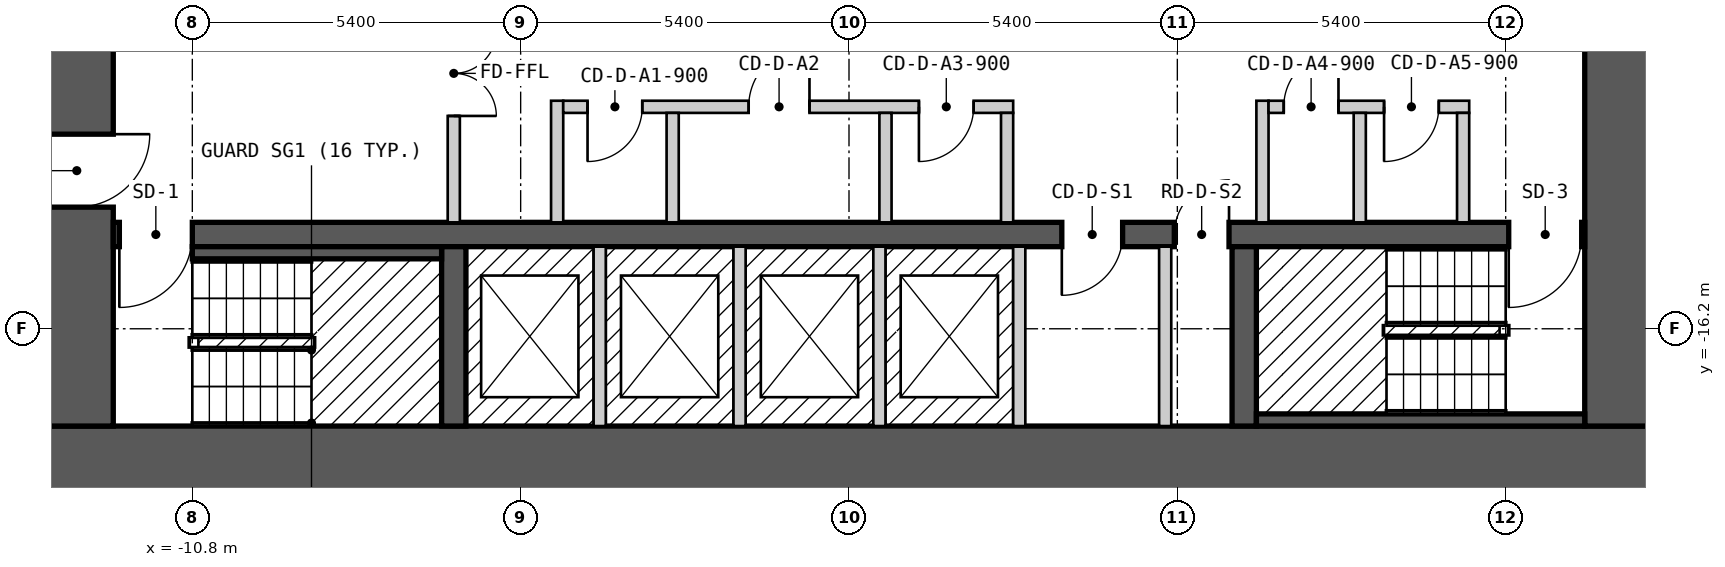
"""IFC4 building model, lengths in metres.
Left out: names, types, materials, properties, quantities, classifications, styles, units other than length and angle.
Written with IfcOpenShell. Run it as: python <this file> out.ifc"""

import sys

from ifc_helpers import new_model, si_unit, direction, frame, frame_2d, origin, place, context, subcontext, project, spatial, rectangle, extrude, element, fill, save


model = new_model("IFC4")
c1 = context("Model", 3, precision=1e-05, world=origin(), true_north=direction((0.0, 1.0)))
c2 = subcontext(c1, "Body", "Model", "MODEL_VIEW")
j1 = project(units=[si_unit("LENGTHUNIT", "METRE"), si_unit("PLANEANGLEUNIT", "RADIAN")], contexts=[c1])
p1 = place(None, origin())
s1 = spatial("IfcSite", under=j1, at=p1, CompositionType="ELEMENT")
p2 = place(p1, origin())
s2 = spatial("IfcBuilding", under=s1, at=p2, CompositionType="ELEMENT")
p3 = place(p2, frame((0.0, 0.0, 59.4)))
s3 = spatial("IfcBuildingStorey", under=s2, at=p3, CompositionType="ELEMENT", Elevation=59.4)
p4 = place(p3, frame((-13.3, -18.4, 0.0), z_axis=(0.0, 0.0, 1.0), x_axis=(1.0, 0.0, 0.0)))
e1 = element("IfcWall", 1, at=p4, inside=s3, PredefinedType="SHEAR", context=c2, shape_type="SweptSolid", body=[
    extrude(rectangle(XDim=26.6, YDim=1.2, at=frame_2d((13.3, 0.0))), origin(), (0.0, 0.0, 1.0), 2.6),
])
p5 = place(p3, frame((-12.7, -17.8, 0.0), z_axis=(0.0, 0.0, 1.0), x_axis=(0.0, 1.0, 0.0)))
e2 = element("IfcWall", 2, at=p5, inside=s3, PredefinedType="SHEAR", context=c2, shape_type="SweptSolid", body=[
    extrude(rectangle(XDim=11.6, YDim=1.2, at=frame_2d((5.8, 0.0))), origin(), (0.0, 0.0, 1.0), 2.6),
])
p6 = place(p5, frame((3.6, 0.0, 0.0)))
e3 = element("IfcOpeningElement", 3, at=p6, cuts=e2, PredefinedType="OPENING", context=c2, shape_type="SweptSolid", body=[
    extrude(rectangle(XDim=1.2, YDim=2.1, at=frame_2d((0.6, 1.05))), frame((0.0, 0.61, 0.0), z_axis=(0.0, -1.0, 0.0), x_axis=(1.0, 0.0, 0.0)), (0.0, 0.0, 1.0), 1.22),
])
p7 = place(p3, frame((12.7, -17.8, 0.0), z_axis=(0.0, 0.0, 1.0), x_axis=(0.0, 1.0, 0.0)))
e4 = element("IfcWall", 4, at=p7, inside=s3, PredefinedType="SHEAR", context=c2, shape_type="SweptSolid", body=[
    extrude(rectangle(XDim=11.6, YDim=1.2, at=frame_2d((5.8, 0.0))), origin(), (0.0, 0.0, 1.0), 2.6),
])
p8 = place(p3, frame((-12.1, -14.65, 0.0), z_axis=(0.0, 0.0, 1.0), x_axis=(1.0, 0.0, 0.0)))
e5 = element("IfcWall", 5, at=p8, inside=s3, PredefinedType="SHEAR", context=c2, shape_type="SweptSolid", body=[
    extrude(rectangle(XDim=24.2, YDim=0.4, at=frame_2d((12.1, 0.0))), origin(), (0.0, 0.0, 1.0), 2.6),
])
p9 = place(p8, frame((1.3, 0.0, 0.0), z_axis=(0.0, 0.0, 1.0), x_axis=(-1.0, 0.0, 0.0)))
e6 = element("IfcOpeningElement", 6, at=p9, cuts=e5, PredefinedType="OPENING", context=c2, shape_type="SweptSolid", body=[
    extrude(rectangle(XDim=1.2, YDim=2.1, at=frame_2d((0.6, 1.05))), frame((0.0, 0.21, 0.0), z_axis=(0.0, -1.0, 0.0), x_axis=(1.0, 0.0, 0.0)), (0.0, 0.0, 1.0), 0.42),
])
p10 = place(p8, frame((24.15, 0.0, 0.0), z_axis=(0.0, 0.0, 1.0), x_axis=(-1.0, 0.0, 0.0)))
e7 = element("IfcOpeningElement", 7, at=p10, cuts=e5, PredefinedType="OPENING", context=c2, shape_type="SweptSolid", body=[
    extrude(rectangle(XDim=1.2, YDim=2.1, at=frame_2d((0.6, 1.05))), frame((0.0, 0.21, 0.0), z_axis=(0.0, -1.0, 0.0), x_axis=(1.0, 0.0, 0.0)), (0.0, 0.0, 1.0), 0.42),
])
p11 = place(p8, frame((16.6, 0.0, 0.0), z_axis=(0.0, 0.0, 1.0), x_axis=(-1.0, 0.0, 0.0)))
e8 = element("IfcOpeningElement", 8, at=p11, cuts=e5, PredefinedType="OPENING", context=c2, shape_type="SweptSolid", body=[
    extrude(rectangle(XDim=1.0, YDim=2.1, at=frame_2d((0.5, 1.05))), frame((0.0, 0.21, 0.0), z_axis=(0.0, -1.0, 0.0), x_axis=(1.0, 0.0, 0.0)), (0.0, 0.0, 1.0), 0.42),
])
p12 = place(p8, frame((18.35, 0.0, 0.0), z_axis=(0.0, 0.0, 1.0), x_axis=(-1.0, 0.0, 0.0)))
e9 = element("IfcOpeningElement", 9, at=p12, cuts=e5, PredefinedType="OPENING", context=c2, shape_type="SweptSolid", body=[
    extrude(rectangle(XDim=0.9, YDim=2.1, at=frame_2d((0.45, 1.05))), frame((0.0, 0.21, 0.0), z_axis=(0.0, -1.0, 0.0), x_axis=(1.0, 0.0, 0.0)), (0.0, 0.0, 1.0), 0.42),
])
for number, where, z_axis, x_axis in (
    (10, (-6.5, -17.8, 0.0), (0.0, 0.0, 1.0), (0.0, 1.0, 0.0)),
    (11, (6.5, -17.8, 0.0), (0.0, 0.0, 1.0), (0.0, 1.0, 0.0)),
):
    element("IfcWall", number, at=place(p3, frame(where, z_axis=z_axis, x_axis=x_axis)), inside=s3, PredefinedType="SHEAR", context=c2, shape_type="SweptSolid", body=[
        extrude(rectangle(XDim=2.95, YDim=0.4, at=frame_2d((1.475, 0.0))), origin(), (0.0, 0.0, 1.0), 2.6),
    ])
p13 = place(p3, frame((-10.8, -14.95, 0.0), z_axis=(0.0, 0.0, 1.0), x_axis=(1.0, 0.0, 0.0)))
e12 = element("IfcWall", 12, at=p13, inside=s3, PredefinedType="SOLIDWALL", context=c2, shape_type="SweptSolid", body=[
    extrude(rectangle(XDim=4.1, YDim=0.2, at=frame_2d((2.05, 0.0))), origin(), (0.0, 0.0, 1.0), 2.6),
])
p14 = place(p3, frame((-6.5, -14.45, 0.0), z_axis=(0.0, 0.0, 1.0), x_axis=(0.0, 1.0, 0.0)))
e13 = element("IfcWall", 13, at=p14, inside=s3, PredefinedType="PARTITIONING", context=c2, shape_type="SweptSolid", body=[
    extrude(rectangle(XDim=4.9, YDim=0.2, at=frame_2d((2.45, 0.0))), origin(), (0.0, 0.0, 1.0), 2.6),
])
p15 = place(p14, frame((3.15, 0.0, 0.0), z_axis=(0.0, 0.0, 1.0), x_axis=(-1.0, 0.0, 0.0)))
e14 = element("IfcOpeningElement", 14, at=p15, cuts=e13, PredefinedType="OPENING", context=c2, shape_type="SweptSolid", body=[
    extrude(rectangle(XDim=1.4, YDim=2.1, at=frame_2d((0.7, 1.05))), frame((0.0, 0.11, 0.0), z_axis=(0.0, -1.0, 0.0), x_axis=(1.0, 0.0, 0.0)), (0.0, 0.0, 1.0), 0.22),
])
p16 = place(p3, frame((-4.8, -14.45, 0.0), z_axis=(0.0, 0.0, 1.0), x_axis=(0.0, 1.0, 0.0)))
e15 = element("IfcWall", 15, at=p16, inside=s3, PredefinedType="PARTITIONING", context=c2, shape_type="SweptSolid", body=[
    extrude(rectangle(XDim=2.0, YDim=0.2, at=frame_2d((1.0, 0.0))), origin(), (0.0, 0.0, 1.0), 2.6),
])
p17 = place(p3, frame((-4.7, -12.55, 0.0), z_axis=(0.0, 0.0, 1.0), x_axis=(1.0, 0.0, 0.0)))
e16 = element("IfcWall", 16, at=p17, inside=s3, PredefinedType="PARTITIONING", context=c2, shape_type="SweptSolid", body=[
    extrude(rectangle(XDim=7.4, YDim=0.2, at=frame_2d((3.7, 0.0))), origin(), (0.0, 0.0, 1.0), 2.6),
])
p18 = place(p17, frame((1.3, 0.0, 0.0), z_axis=(0.0, 0.0, 1.0), x_axis=(-1.0, 0.0, 0.0)))
e17 = element("IfcOpeningElement", 17, at=p18, cuts=e16, PredefinedType="OPENING", context=c2, shape_type="SweptSolid", body=[
    extrude(rectangle(XDim=0.9, YDim=2.1, at=frame_2d((0.45, 1.05))), frame((0.0, 0.11, 0.0), z_axis=(0.0, -1.0, 0.0), x_axis=(1.0, 0.0, 0.0)), (0.0, 0.0, 1.0), 0.22),
])
p19 = place(p17, frame((4.05, 0.0, 0.0), z_axis=(0.0, 0.0, 1.0), x_axis=(-1.0, 0.0, 0.0)))
e18 = element("IfcOpeningElement", 18, at=p19, cuts=e16, PredefinedType="OPENING", context=c2, shape_type="SweptSolid", body=[
    extrude(rectangle(XDim=1.0, YDim=2.1, at=frame_2d((0.5, 1.05))), frame((0.0, 0.11, 0.0), z_axis=(0.0, -1.0, 0.0), x_axis=(1.0, 0.0, 0.0)), (0.0, 0.0, 1.0), 0.22),
])
p20 = place(p17, frame((6.75, 0.0, 0.0), z_axis=(0.0, 0.0, 1.0), x_axis=(-1.0, 0.0, 0.0)))
e19 = element("IfcOpeningElement", 19, at=p20, cuts=e16, PredefinedType="OPENING", context=c2, shape_type="SweptSolid", body=[
    extrude(rectangle(XDim=0.9, YDim=2.1, at=frame_2d((0.45, 1.05))), frame((0.0, 0.11, 0.0), z_axis=(0.0, -1.0, 0.0), x_axis=(1.0, 0.0, 0.0)), (0.0, 0.0, 1.0), 0.22),
])
p21 = place(p3, frame((-4.1, -17.8, 0.0), z_axis=(0.0, 0.0, 1.0), x_axis=(0.0, 1.0, 0.0)))
e20 = element("IfcWall", 20, at=p21, inside=s3, PredefinedType="SOLIDWALL", context=c2, shape_type="SweptSolid", body=[
    extrude(rectangle(XDim=2.95, YDim=0.2, at=frame_2d((1.475, 0.0))), origin(), (0.0, 0.0, 1.0), 2.6),
])
p22 = place(p3, frame((-2.9, -14.45, 0.0), z_axis=(0.0, 0.0, 1.0), x_axis=(0.0, 1.0, 0.0)))
e21 = element("IfcWall", 21, at=p22, inside=s3, PredefinedType="PARTITIONING", context=c2, shape_type="SweptSolid", body=[
    extrude(rectangle(XDim=1.8, YDim=0.2, at=frame_2d((0.9, 0.0))), origin(), (0.0, 0.0, 1.0), 2.6),
])
for number, where, z_axis, x_axis in (
    (22, (-1.8, -17.8, 0.0), (0.0, 0.0, 1.0), (0.0, 1.0, 0.0)),
    (23, (0.5, -17.8, 0.0), (0.0, 0.0, 1.0), (0.0, 1.0, 0.0)),
):
    element("IfcWall", number, at=place(p3, frame(where, z_axis=z_axis, x_axis=x_axis)), inside=s3, PredefinedType="SOLIDWALL", context=c2, shape_type="SweptSolid", body=[
        extrude(rectangle(XDim=2.95, YDim=0.2, at=frame_2d((1.475, 0.0))), origin(), (0.0, 0.0, 1.0), 2.6),
    ])
for number, where, z_axis, x_axis in (
    (24, (0.6, -14.45, 0.0), (0.0, 0.0, 1.0), (0.0, 1.0, 0.0)),
    (25, (2.6, -14.45, 0.0), (0.0, 0.0, 1.0), (0.0, 1.0, 0.0)),
):
    element("IfcWall", number, at=place(p3, frame(where, z_axis=z_axis, x_axis=x_axis)), inside=s3, PredefinedType="PARTITIONING", context=c2, shape_type="SweptSolid", body=[
        extrude(rectangle(XDim=1.8, YDim=0.2, at=frame_2d((0.9, 0.0))), origin(), (0.0, 0.0, 1.0), 2.6),
    ])
p23 = place(p3, frame((2.8, -17.8, 0.0), z_axis=(0.0, 0.0, 1.0), x_axis=(0.0, 1.0, 0.0)))
e26 = element("IfcWall", 26, at=p23, inside=s3, PredefinedType="SOLIDWALL", context=c2, shape_type="SweptSolid", body=[
    extrude(rectangle(XDim=2.95, YDim=0.2, at=frame_2d((1.475, 0.0))), origin(), (0.0, 0.0, 1.0), 2.6),
])
p24 = place(p3, frame((5.2, -17.8, 0.0), z_axis=(0.0, 0.0, 1.0), x_axis=(0.0, 1.0, 0.0)))
e27 = element("IfcWall", 27, at=p24, inside=s3, PredefinedType="PARTITIONING", context=c2, shape_type="SweptSolid", body=[
    extrude(rectangle(XDim=2.95, YDim=0.2, at=frame_2d((1.475, 0.0))), origin(), (0.0, 0.0, 1.0), 2.6),
])
p25 = place(p3, frame((6.7, -17.7, 0.0), z_axis=(0.0, 0.0, 1.0), x_axis=(1.0, 0.0, 0.0)))
e28 = element("IfcWall", 28, at=p25, inside=s3, PredefinedType="SOLIDWALL", context=c2, shape_type="SweptSolid", body=[
    extrude(rectangle(XDim=5.4, YDim=0.2, at=frame_2d((2.7, 0.0))), origin(), (0.0, 0.0, 1.0), 2.6),
])
p26 = place(p3, frame((6.8, -14.45, 0.0), z_axis=(0.0, 0.0, 1.0), x_axis=(0.0, 1.0, 0.0)))
e29 = element("IfcWall", 29, at=p26, inside=s3, PredefinedType="PARTITIONING", context=c2, shape_type="SweptSolid", body=[
    extrude(rectangle(XDim=2.0, YDim=0.2, at=frame_2d((1.0, 0.0))), origin(), (0.0, 0.0, 1.0), 2.6),
])
p27 = place(p3, frame((6.9, -12.55, 0.0), z_axis=(0.0, 0.0, 1.0), x_axis=(1.0, 0.0, 0.0)))
e30 = element("IfcWall", 30, at=p27, inside=s3, PredefinedType="PARTITIONING", context=c2, shape_type="SweptSolid", body=[
    extrude(rectangle(XDim=3.3, YDim=0.2, at=frame_2d((1.65, 0.0))), origin(), (0.0, 0.0, 1.0), 2.6),
])
p28 = place(p27, frame((1.15, 0.0, 0.0), z_axis=(0.0, 0.0, 1.0), x_axis=(-1.0, 0.0, 0.0)))
e31 = element("IfcOpeningElement", 31, at=p28, cuts=e30, PredefinedType="OPENING", context=c2, shape_type="SweptSolid", body=[
    extrude(rectangle(XDim=0.9, YDim=2.1, at=frame_2d((0.45, 1.05))), frame((0.0, 0.11, 0.0), z_axis=(0.0, -1.0, 0.0), x_axis=(1.0, 0.0, 0.0)), (0.0, 0.0, 1.0), 0.22),
])
p29 = place(p27, frame((2.8, 0.0, 0.0), z_axis=(0.0, 0.0, 1.0), x_axis=(-1.0, 0.0, 0.0)))
e32 = element("IfcOpeningElement", 32, at=p29, cuts=e30, PredefinedType="OPENING", context=c2, shape_type="SweptSolid", body=[
    extrude(rectangle(XDim=0.9, YDim=2.1, at=frame_2d((0.45, 1.05))), frame((0.0, 0.11, 0.0), z_axis=(0.0, -1.0, 0.0), x_axis=(1.0, 0.0, 0.0)), (0.0, 0.0, 1.0), 0.22),
])
for number, where, z_axis, x_axis in (
    (33, (8.4, -14.45, 0.0), (0.0, 0.0, 1.0), (0.0, 1.0, 0.0)),
    (34, (10.1, -14.45, 0.0), (0.0, 0.0, 1.0), (0.0, 1.0, 0.0)),
):
    element("IfcWall", number, at=place(p3, frame(where, z_axis=z_axis, x_axis=x_axis)), inside=s3, PredefinedType="PARTITIONING", context=c2, shape_type="SweptSolid", body=[
        extrude(rectangle(XDim=1.8, YDim=0.2, at=frame_2d((0.9, 0.0))), origin(), (0.0, 0.0, 1.0), 2.6),
    ])
p30 = place(p9, origin())
e35 = element("IfcDoor", 35, at=p30, inside=s3, OperationType="SINGLE_SWING_RIGHT", PredefinedType="DOOR", context=c2, shape_type="SweptSolid", body=[
    extrude(rectangle(XDim=1.2, YDim=2.1, at=frame_2d((0.6, 1.05))), frame((0.0, 0.025, 0.0), z_axis=(0.0, -1.0, 0.0), x_axis=(1.0, 0.0, 0.0)), (0.0, 0.0, 1.0), 0.05),
])
fill(e6, e35)
p31 = place(p10, origin())
e36 = element("IfcDoor", 36, at=p31, inside=s3, OperationType="SINGLE_SWING_RIGHT", PredefinedType="DOOR", context=c2, shape_type="SweptSolid", body=[
    extrude(rectangle(XDim=1.2, YDim=2.1, at=frame_2d((0.6, 1.05))), frame((0.0, 0.025, 0.0), z_axis=(0.0, -1.0, 0.0), x_axis=(1.0, 0.0, 0.0)), (0.0, 0.0, 1.0), 0.05),
])
fill(e7, e36)
p32 = place(p6, origin())
e37 = element("IfcDoor", 37, at=p32, inside=s3, OperationType="SINGLE_SWING_RIGHT", PredefinedType="DOOR", context=c2, shape_type="SweptSolid", body=[
    extrude(rectangle(XDim=1.2, YDim=2.1, at=frame_2d((0.6, 1.05))), frame((0.0, 0.025, 0.0), z_axis=(0.0, -1.0, 0.0), x_axis=(1.0, 0.0, 0.0)), (0.0, 0.0, 1.0), 0.05),
])
fill(e3, e37)
p33 = place(p15, origin())
e38 = element("IfcDoor", 38, at=p33, inside=s3, OperationType="DOUBLE_DOOR_SINGLE_SWING", PredefinedType="DOOR", context=c2, shape_type="SweptSolid", body=[
    extrude(rectangle(XDim=1.4, YDim=2.1, at=frame_2d((0.7, 1.05))), frame((0.0, 0.025, 0.0), z_axis=(0.0, -1.0, 0.0), x_axis=(1.0, 0.0, 0.0)), (0.0, 0.0, 1.0), 0.05),
])
fill(e14, e38)
p34 = place(p18, origin())
e39 = element("IfcDoor", 39, at=p34, inside=s3, OperationType="SINGLE_SWING_RIGHT", PredefinedType="DOOR", context=c2, shape_type="SweptSolid", body=[
    extrude(rectangle(XDim=0.9, YDim=2.1, at=frame_2d((0.45, 1.05))), frame((0.0, 0.025, 0.0), z_axis=(0.0, -1.0, 0.0), x_axis=(1.0, 0.0, 0.0)), (0.0, 0.0, 1.0), 0.05),
])
fill(e17, e39)
p35 = place(p19, origin())
e40 = element("IfcDoor", 40, at=p35, inside=s3, OperationType="SINGLE_SWING_LEFT", PredefinedType="DOOR", context=c2, shape_type="SweptSolid", body=[
    extrude(rectangle(XDim=1.0, YDim=2.1, at=frame_2d((0.5, 1.05))), frame((0.0, 0.025, 0.0), z_axis=(0.0, -1.0, 0.0), x_axis=(1.0, 0.0, 0.0)), (0.0, 0.0, 1.0), 0.05),
])
fill(e18, e40)
p36 = place(p20, origin())
e41 = element("IfcDoor", 41, at=p36, inside=s3, OperationType="SINGLE_SWING_RIGHT", PredefinedType="DOOR", context=c2, shape_type="SweptSolid", body=[
    extrude(rectangle(XDim=0.9, YDim=2.1, at=frame_2d((0.45, 1.05))), frame((0.0, 0.025, 0.0), z_axis=(0.0, -1.0, 0.0), x_axis=(1.0, 0.0, 0.0)), (0.0, 0.0, 1.0), 0.05),
])
fill(e19, e41)
p37 = place(p28, origin())
e42 = element("IfcDoor", 42, at=p37, inside=s3, OperationType="SINGLE_SWING_LEFT", PredefinedType="DOOR", context=c2, shape_type="SweptSolid", body=[
    extrude(rectangle(XDim=0.9, YDim=2.1, at=frame_2d((0.45, 1.05))), frame((0.0, 0.025, 0.0), z_axis=(0.0, -1.0, 0.0), x_axis=(1.0, 0.0, 0.0)), (0.0, 0.0, 1.0), 0.05),
])
fill(e31, e42)
p38 = place(p29, origin())
e43 = element("IfcDoor", 43, at=p38, inside=s3, OperationType="SINGLE_SWING_RIGHT", PredefinedType="DOOR", context=c2, shape_type="SweptSolid", body=[
    extrude(rectangle(XDim=0.9, YDim=2.1, at=frame_2d((0.45, 1.05))), frame((0.0, 0.025, 0.0), z_axis=(0.0, -1.0, 0.0), x_axis=(1.0, 0.0, 0.0)), (0.0, 0.0, 1.0), 0.05),
])
fill(e32, e43)
p39 = place(p11, origin())
e44 = element("IfcDoor", 44, at=p39, inside=s3, OperationType="SINGLE_SWING_RIGHT", PredefinedType="DOOR", context=c2, shape_type="SweptSolid", body=[
    extrude(rectangle(XDim=1.0, YDim=2.1, at=frame_2d((0.5, 1.05))), frame((0.0, 0.025, 0.0), z_axis=(0.0, -1.0, 0.0), x_axis=(1.0, 0.0, 0.0)), (0.0, 0.0, 1.0), 0.05),
])
fill(e8, e44)
p40 = place(p12, origin())
e45 = element("IfcDoor", 45, at=p40, inside=s3, OperationType="SINGLE_SWING_LEFT", PredefinedType="DOOR", context=c2, shape_type="SweptSolid", body=[
    extrude(rectangle(XDim=0.9, YDim=2.1, at=frame_2d((0.45, 1.05))), frame((0.0, 0.025, 0.0), z_axis=(0.0, -1.0, 0.0), x_axis=(1.0, 0.0, 0.0)), (0.0, 0.0, 1.0), 0.05),
])
fill(e9, e45)
save(model, sys.argv[1])
